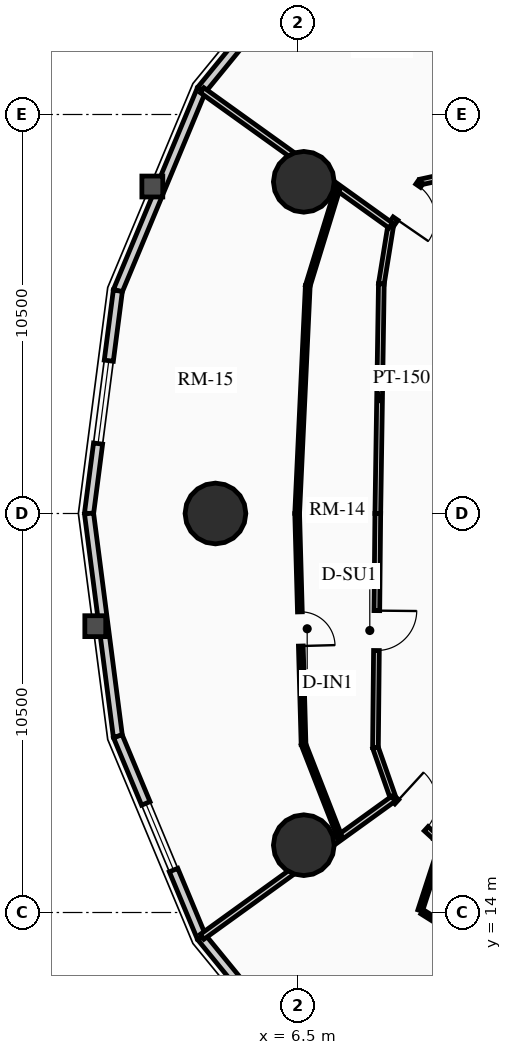
"""IFC4 building model, lengths in metres.
Left out: names, types, materials, properties, quantities, classifications, styles, units other than length and angle.
Written with IfcOpenShell. Run it as: python <this file> out.ifc"""

import sys

from ifc_helpers import new_model, si_unit, direction, frame, frame_2d, origin, origin_2d, place, context, subcontext, project, spatial, rectangle, circle, extrude, source, transform, mapped, element, fill, save


model = new_model("IFC4")
c1 = context("Model", 3, precision=1e-05, world=origin(), true_north=direction((0.0, 1.0)))
c2 = subcontext(c1, "Body", "Model", "MODEL_VIEW")
j1 = project(units=[si_unit("LENGTHUNIT", "METRE"), si_unit("PLANEANGLEUNIT", "RADIAN")], contexts=[c1])
p1 = place(None, origin())
s1 = spatial("IfcSite", under=j1, at=p1, CompositionType="ELEMENT")
p2 = place(p1, origin())
s2 = spatial("IfcBuilding", under=s1, at=p2, CompositionType="ELEMENT")
p3 = place(p2, frame((0.0, 0.0, 42.37)))
s3 = spatial("IfcBuildingStorey", under=s2, at=p3, CompositionType="ELEMENT", Elevation=42.37)
for number, where, z_axis, x_axis in (
    (1, (6.653, 33.229, 0.0), (0.0, 0.0, 1.0), (1.0, 0.0, 0.0)),
    (2, (4.328, 24.5, 0.0), (0.0, 0.0, 1.0), (1.0, 0.0, 0.0)),
    (3, (6.653, 15.771, 0.0), (0.0, 0.0, 1.0), (1.0, 0.0, 0.0)),
):
    element("IfcColumn", number, at=place(p3, frame(where, z_axis=z_axis, x_axis=x_axis)), inside=s3, PredefinedType="USERDEFINED", context=c2, shape_type="SweptSolid", body=[
        extrude(circle(Radius=0.8, at=origin_2d()), origin(), (0.0, 0.0, 1.0), 2.91),
    ])
p4 = place(p3, frame((3.961, 35.65, 0.0), z_axis=(0.0, 0.0, 1.0), x_axis=(0.632710215588, 0.774388651189, 0.0)))
e4 = element("IfcWall", 4, at=p4, inside=s3, PredefinedType="SOLIDWALL", context=c2, shape_type="SweptSolid", body=[
    extrude(rectangle(XDim=5.419, YDim=0.24, at=frame_2d((2.71, 0.0))), origin(), (0.0, 0.0, 1.0), 2.073),
])
m1 = source(origin(), c2, "Body", "SweptSolid", [
    extrude(rectangle(XDim=1.9, YDim=1.35, at=frame_2d((0.95, 0.675))), frame((0.0, 0.13, 0.0), z_axis=(0.0, -1.0, 0.0), x_axis=(1.0, 0.0, 0.0)), (0.0, 0.0, 1.0), 0.26),
])
p5 = place(p4, frame((1.76, 0.0, 0.65)))
e5 = element("IfcOpeningElement", 5, at=p5, cuts=e4, PredefinedType="OPENING", context=c2, shape_type="MappedRepresentation", body=[
    mapped(m1, transform((0.0, 0.0, 0.0), x_axis=(1.0, 0.0, 0.0), y_axis=(0.0, 1.0, 0.0), z_axis=(0.0, 0.0, 1.0), scale=1.0)),
])
p6 = place(p3, frame((1.76, 30.362, 0.0), z_axis=(0.0, 0.0, 1.0), x_axis=(0.38430970593, 0.923204229804, 0.0)))
e6 = element("IfcWall", 6, at=p6, inside=s3, PredefinedType="SOLIDWALL", context=c2, shape_type="SweptSolid", body=[
    extrude(rectangle(XDim=5.728, YDim=0.24, at=frame_2d((2.864, 0.0))), origin(), (0.0, 0.0, 1.0), 2.073),
])
p7 = place(p3, frame((1.001, 24.5, 0.0), z_axis=(0.0, 0.0, 1.0), x_axis=(0.128329107357, 0.991731637191, 0.0)))
e7 = element("IfcWall", 7, at=p7, inside=s3, PredefinedType="SOLIDWALL", context=c2, shape_type="SweptSolid", body=[
    extrude(rectangle(XDim=5.911, YDim=0.24, at=frame_2d((2.956, 0.0))), origin(), (0.0, 0.0, 1.0), 2.073),
])
m2 = source(origin(), c2, "Body", "SweptSolid", [
    extrude(rectangle(XDim=2.2, YDim=1.35, at=frame_2d((1.1, 0.675))), frame((0.0, 0.13, 0.0), z_axis=(0.0, -1.0, 0.0), x_axis=(1.0, 0.0, 0.0)), (0.0, 0.0, 1.0), 0.26),
])
p8 = place(p7, frame((1.855, 0.0, 0.65)))
e8 = element("IfcOpeningElement", 8, at=p8, cuts=e7, PredefinedType="OPENING", context=c2, shape_type="MappedRepresentation", body=[
    mapped(m2, transform((0.0, 0.0, 0.0), x_axis=(1.0, 0.0, 0.0), y_axis=(0.0, 1.0, 0.0), z_axis=(0.0, 0.0, 1.0), scale=1.0)),
])
p9 = place(p3, frame((1.76, 18.638, 0.0), z_axis=(0.0, 0.0, 1.0), x_axis=(-0.128329107357, 0.991731637191, 0.0)))
e9 = element("IfcWall", 9, at=p9, inside=s3, PredefinedType="SOLIDWALL", context=c2, shape_type="SweptSolid", body=[
    extrude(rectangle(XDim=5.911, YDim=0.24, at=frame_2d((2.956, 0.0))), origin(), (0.0, 0.0, 1.0), 2.073),
])
p10 = place(p3, frame((3.961, 13.35, 0.0), z_axis=(0.0, 0.0, 1.0), x_axis=(-0.38430970593, 0.923204229804, 0.0)))
e10 = element("IfcWall", 10, at=p10, inside=s3, PredefinedType="SOLIDWALL", context=c2, shape_type="SweptSolid", body=[
    extrude(rectangle(XDim=5.728, YDim=0.24, at=frame_2d((2.864, 0.0))), origin(), (0.0, 0.0, 1.0), 2.073),
])
p11 = place(p10, frame((1.914, 0.0, 0.65)))
e11 = element("IfcOpeningElement", 11, at=p11, cuts=e10, PredefinedType="OPENING", context=c2, shape_type="MappedRepresentation", body=[
    mapped(m1, transform((0.0, 0.0, 0.0), x_axis=(1.0, 0.0, 0.0), y_axis=(0.0, 1.0, 0.0), z_axis=(0.0, 0.0, 1.0), scale=1.0)),
])
p12 = place(p3, frame((7.39, 9.153, 0.0), z_axis=(0.0, 0.0, 1.0), x_axis=(-0.632710215588, 0.774388651189, 0.0)))
e12 = element("IfcWall", 12, at=p12, inside=s3, PredefinedType="SOLIDWALL", context=c2, shape_type="SweptSolid", body=[
    extrude(rectangle(XDim=5.419, YDim=0.24, at=frame_2d((2.71, 0.0))), origin(), (0.0, 0.0, 1.0), 2.073),
])
p13 = place(p3, frame((11.62, 33.637, 0.0), z_axis=(0.0, 0.0, 1.0), x_axis=(-0.97702579435, -0.213121085711, 0.0)))
e13 = element("IfcWall", 13, at=p13, inside=s3, PredefinedType="PARTITIONING", context=c2, shape_type="SweptSolid", body=[
    extrude(rectangle(XDim=1.935, YDim=0.15, at=frame_2d((0.967, 0.0))), origin(), (0.0, 0.0, 1.0), 2.159),
])
p14 = place(p3, frame((9.729, 33.225, 0.0), z_axis=(0.0, 0.0, 1.0), x_axis=(-0.567183649484, -0.82359134755, 0.0)))
e14 = element("IfcWall", 14, at=p14, inside=s3, PredefinedType="PARTITIONING", context=c2, shape_type="SweptSolid", body=[
    extrude(rectangle(XDim=1.392, YDim=0.15, at=frame_2d((0.696, 0.0))), origin(), (0.0, 0.0, 1.0), 2.159),
])
m3 = source(origin(), c2, "Body", "SweptSolid", [
    extrude(rectangle(XDim=1.05, YDim=2.015, at=frame_2d((0.525, 1.007))), frame((0.0, 0.085, 0.0), z_axis=(0.0, -1.0, 0.0), x_axis=(1.0, 0.0, 0.0)), (0.0, 0.0, 1.0), 0.17),
])
p15 = place(p14, frame((0.12, 0.0, 0.0)))
e15 = element("IfcOpeningElement", 15, at=p15, cuts=e14, PredefinedType="OPENING", context=c2, shape_type="MappedRepresentation", body=[
    mapped(m3, transform((0.0, 0.0, 0.0), x_axis=(1.0, 0.0, 0.0), y_axis=(0.0, 1.0, 0.0), z_axis=(0.0, 0.0, 1.0), scale=1.0)),
])
p16 = place(p3, frame((8.94, 32.078, 0.0), z_axis=(0.0, 0.0, 1.0), x_axis=(-0.159148467753, -0.98725466077, 0.0)))
e16 = element("IfcWall", 16, at=p16, inside=s3, PredefinedType="PARTITIONING", context=c2, shape_type="SweptSolid", body=[
    extrude(rectangle(XDim=1.554, YDim=0.15, at=frame_2d((0.777, 0.0))), origin(), (0.0, 0.0, 1.0), 2.205),
])
p17 = place(p3, frame((8.693, 30.544, 0.0), z_axis=(0.0, 0.0, 1.0), x_axis=(-0.015307007986, -0.99988284089, 0.0)))
e17 = element("IfcWall", 17, at=p17, inside=s3, PredefinedType="PARTITIONING", context=c2, shape_type="SweptSolid", body=[
    extrude(rectangle(XDim=6.045, YDim=0.15, at=frame_2d((3.022, 0.0))), origin(), (0.0, 0.0, 1.0), 2.635),
])
p18 = place(p3, frame((8.6, 24.5, 0.0), z_axis=(0.0, 0.0, 1.0), x_axis=(-0.010023665349, -0.999949761805, 0.0)))
e18 = element("IfcWall", 18, at=p18, inside=s3, PredefinedType="PARTITIONING", context=c2, shape_type="SweptSolid", body=[
    extrude(rectangle(XDim=6.162, YDim=0.15, at=frame_2d((3.081, 0.0))), origin(), (0.0, 0.0, 1.0), 2.159),
])
p19 = place(p18, frame((2.556, 0.0, 0.0)))
e19 = element("IfcOpeningElement", 19, at=p19, cuts=e18, PredefinedType="OPENING", context=c2, shape_type="MappedRepresentation", body=[
    mapped(m3, transform((0.0, 0.0, 0.0), x_axis=(1.0, 0.0, 0.0), y_axis=(0.0, 1.0, 0.0), z_axis=(0.0, 0.0, 1.0), scale=1.0)),
])
p20 = place(p3, frame((8.538, 18.338, 0.0), z_axis=(0.0, 0.0, 1.0), x_axis=(0.331358150167, -0.94350504838, 0.0)))
e20 = element("IfcWall", 20, at=p20, inside=s3, PredefinedType="PARTITIONING", context=c2, shape_type="SweptSolid", body=[
    extrude(rectangle(XDim=1.424, YDim=0.15, at=frame_2d((0.712, 0.0))), origin(), (0.0, 0.0, 1.0), 2.205),
])
p21 = place(p3, frame((9.01, 16.994, 0.0), z_axis=(0.0, 0.0, 1.0), x_axis=(0.737701798986, -0.67512669609, 0.0)))
e21 = element("IfcWall", 21, at=p21, inside=s3, PredefinedType="PARTITIONING", context=c2, shape_type="SweptSolid", body=[
    extrude(rectangle(XDim=1.498, YDim=0.15, at=frame_2d((0.749, 0.0))), origin(), (0.0, 0.0, 1.0), 2.159),
])
p22 = place(p21, frame((0.12, 0.0, 0.0)))
e22 = element("IfcOpeningElement", 22, at=p22, cuts=e21, PredefinedType="OPENING", context=c2, shape_type="MappedRepresentation", body=[
    mapped(m3, transform((0.0, 0.0, 0.0), x_axis=(1.0, 0.0, 0.0), y_axis=(0.0, 1.0, 0.0), z_axis=(0.0, 0.0, 1.0), scale=1.0)),
])
p23 = place(p3, frame((8.94, 32.078, 0.0), z_axis=(0.0, 0.0, 1.0), x_axis=(-0.812546070691, 0.582896974606, 0.0)))
e23 = element("IfcWall", 23, at=p23, inside=s3, PredefinedType="PARTITIONING", context=c2, shape_type="SweptSolid", body=[
    extrude(rectangle(XDim=6.107, YDim=0.16, at=frame_2d((3.054, 0.0))), origin(), (0.0, 0.0, 1.0), 2.073),
])
p24 = place(p3, frame((9.01, 16.994, 0.0), z_axis=(0.0, 0.0, 1.0), x_axis=(-0.810839958558, -0.585267940012, 0.0)))
e24 = element("IfcWall", 24, at=p24, inside=s3, PredefinedType="PARTITIONING", context=c2, shape_type="SweptSolid", body=[
    extrude(rectangle(XDim=6.207, YDim=0.16, at=frame_2d((3.104, 0.0))), origin(), (0.0, 0.0, 1.0), 2.073),
])
p25 = place(p3, frame((7.55, 33.075, 0.0), z_axis=(0.0, 0.0, 1.0), x_axis=(-0.29356532185, -0.955939015736, 0.0)))
e25 = element("IfcWall", 25, at=p25, inside=s3, PredefinedType="PARTITIONING", context=c2, shape_type="SweptSolid", body=[
    extrude(rectangle(XDim=2.703, YDim=0.125, at=frame_2d((1.352, 0.0))), origin(), (0.0, 0.0, 1.0), 2.159),
])
p26 = place(p3, frame((6.757, 30.491, 0.0), z_axis=(0.0, 0.0, 1.0), x_axis=(-0.046524684881, -0.998917140556, 0.0)))
e26 = element("IfcWall", 26, at=p26, inside=s3, PredefinedType="PARTITIONING", context=c2, shape_type="SweptSolid", body=[
    extrude(rectangle(XDim=5.998, YDim=0.125, at=frame_2d((2.999, 0.0))), origin(), (0.0, 0.0, 1.0), 2.635),
])
p27 = place(p3, frame((6.478, 24.5, 0.0), z_axis=(0.0, 0.0, 1.0), x_axis=(0.027593153947, -0.999619236437, 0.0)))
e27 = element("IfcWall", 27, at=p27, inside=s3, PredefinedType="PARTITIONING", context=c2, shape_type="SweptSolid", body=[
    extrude(rectangle(XDim=6.078, YDim=0.125, at=frame_2d((3.039, 0.0))), origin(), (0.0, 0.0, 1.0), 2.159),
])
m4 = source(origin(), c2, "Body", "SweptSolid", [
    extrude(rectangle(XDim=0.9, YDim=2.005, at=frame_2d((0.45, 1.002))), frame((0.0, 0.073, 0.0), z_axis=(0.0, -1.0, 0.0), x_axis=(1.0, 0.0, 0.0)), (0.0, 0.0, 1.0), 0.145),
])
p28 = place(p27, frame((2.589, 0.0, 0.0)))
e28 = element("IfcOpeningElement", 28, at=p28, cuts=e27, PredefinedType="OPENING", context=c2, shape_type="MappedRepresentation", body=[
    mapped(m4, transform((0.0, 0.0, 0.0), x_axis=(1.0, 0.0, 0.0), y_axis=(0.0, 1.0, 0.0), z_axis=(0.0, 0.0, 1.0), scale=1.0)),
])
p29 = place(p3, frame((6.646, 18.424, 0.0), z_axis=(0.0, 0.0, 1.0), x_axis=(0.363782486735, -0.931483924899, 0.0)))
e29 = element("IfcWall", 29, at=p29, inside=s3, PredefinedType="PARTITIONING", context=c2, shape_type="SweptSolid", body=[
    extrude(rectangle(XDim=2.627, YDim=0.125, at=frame_2d((1.313, 0.0))), origin(), (0.0, 0.0, 1.0), 2.159),
])
p30 = place(p3, frame((10.235, 15.651, 0.0), z_axis=(0.0, 0.0, 1.0), x_axis=(-0.309082792716, -0.951035134602, 0.0)))
e30 = element("IfcWall", 30, at=p30, inside=s3, PredefinedType="PARTITIONING", context=c2, shape_type="SweptSolid", body=[
    extrude(rectangle(XDim=1.683, YDim=0.125, at=frame_2d((0.842, 0.0))), origin(), (0.0, 0.0, 1.0), 2.205),
])
p31 = place(p3, frame((9.767, 14.017, 0.0), z_axis=(0.0, 0.0, 1.0), x_axis=(0.846347510567, -0.532631102506, 0.0)))
e31 = element("IfcWall", 31, at=p31, inside=s3, PredefinedType="PARTITIONING", context=c2, shape_type="SweptSolid", body=[
    extrude(rectangle(XDim=1.991, YDim=0.125, at=frame_2d((0.995, 0.0))), origin(), (0.0, 0.0, 1.0), 2.635),
])
p32 = place(p31, frame((0.439, 0.0, 0.0)))
e32 = element("IfcOpeningElement", 32, at=p32, cuts=e31, PredefinedType="OPENING", context=c2, shape_type="MappedRepresentation", body=[
    mapped(m4, transform((0.0, 0.0, 0.0), x_axis=(1.0, 0.0, 0.0), y_axis=(0.0, 1.0, 0.0), z_axis=(0.0, 0.0, 1.0), scale=1.0)),
])
m5 = source(origin(), c2, "Body", "SweptSolid", [
    extrude(rectangle(XDim=2.2, YDim=1.35, at=frame_2d((1.1, 0.675))), frame((0.0, 0.03, 0.0), z_axis=(0.0, -1.0, 0.0), x_axis=(1.0, 0.0, 0.0)), (0.0, 0.0, 1.0), 0.06),
])
p33 = place(p8, origin())
e33 = element("IfcWindow", 33, at=p33, inside=s3, PartitioningType="DOUBLE_PANEL_VERTICAL", PredefinedType="WINDOW", context=c2, shape_type="MappedRepresentation", body=[
    mapped(m5, transform((0.0, 0.0, 0.0), x_axis=(1.0, 0.0, 0.0), y_axis=(0.0, 1.0, 0.0), z_axis=(0.0, 0.0, 1.0), scale=1.0)),
])
fill(e8, e33)
m6 = source(origin(), c2, "Body", "SweptSolid", [
    extrude(rectangle(XDim=1.9, YDim=1.35, at=frame_2d((0.95, 0.675))), frame((0.0, 0.03, 0.0), z_axis=(0.0, -1.0, 0.0), x_axis=(1.0, 0.0, 0.0)), (0.0, 0.0, 1.0), 0.06),
])
p34 = place(p11, origin())
e34 = element("IfcWindow", 34, at=p34, inside=s3, PartitioningType="DOUBLE_PANEL_VERTICAL", PredefinedType="WINDOW", context=c2, shape_type="MappedRepresentation", body=[
    mapped(m6, transform((0.0, 0.0, 0.0), x_axis=(1.0, 0.0, 0.0), y_axis=(0.0, 1.0, 0.0), z_axis=(0.0, 0.0, 1.0), scale=1.0)),
])
fill(e11, e34)
m7 = source(origin(), c2, "Body", "SweptSolid", [
    extrude(rectangle(XDim=1.05, YDim=2.015, at=frame_2d((0.525, 1.007))), frame((0.0, 0.025, 0.0), z_axis=(0.0, -1.0, 0.0), x_axis=(1.0, 0.0, 0.0)), (0.0, 0.0, 1.0), 0.05),
])
p35 = place(p15, origin())
e35 = element("IfcDoor", 35, at=p35, inside=s3, OperationType="SINGLE_SWING_RIGHT", PredefinedType="DOOR", context=c2, shape_type="MappedRepresentation", body=[
    mapped(m7, transform((0.0, 0.0, 0.0), x_axis=(1.0, 0.0, 0.0), y_axis=(0.0, 1.0, 0.0), z_axis=(0.0, 0.0, 1.0), scale=1.0)),
])
fill(e15, e35)
p36 = place(p19, origin())
e36 = element("IfcDoor", 36, at=p36, inside=s3, OperationType="SINGLE_SWING_LEFT", PredefinedType="DOOR", context=c2, shape_type="MappedRepresentation", body=[
    mapped(m7, transform((0.0, 0.0, 0.0), x_axis=(1.0, 0.0, 0.0), y_axis=(0.0, 1.0, 0.0), z_axis=(0.0, 0.0, 1.0), scale=1.0)),
])
fill(e19, e36)
m8 = source(origin(), c2, "Body", "SweptSolid", [
    extrude(rectangle(XDim=0.9, YDim=2.005, at=frame_2d((0.45, 1.002))), frame((0.0, 0.025, 0.0), z_axis=(0.0, -1.0, 0.0), x_axis=(1.0, 0.0, 0.0)), (0.0, 0.0, 1.0), 0.05),
])
p37 = place(p28, origin())
e37 = element("IfcDoor", 37, at=p37, inside=s3, OperationType="SINGLE_SWING_RIGHT", PredefinedType="DOOR", context=c2, shape_type="MappedRepresentation", body=[
    mapped(m8, transform((0.0, 0.0, 0.0), x_axis=(1.0, 0.0, 0.0), y_axis=(0.0, 1.0, 0.0), z_axis=(0.0, 0.0, 1.0), scale=1.0)),
])
fill(e28, e37)
p38 = place(p22, origin())
e38 = element("IfcDoor", 38, at=p38, inside=s3, OperationType="SINGLE_SWING_LEFT", PredefinedType="DOOR", context=c2, shape_type="MappedRepresentation", body=[
    mapped(m7, transform((0.0, 0.0, 0.0), x_axis=(1.0, 0.0, 0.0), y_axis=(0.0, 1.0, 0.0), z_axis=(0.0, 0.0, 1.0), scale=1.0)),
])
fill(e22, e38)
save(model, sys.argv[1])
